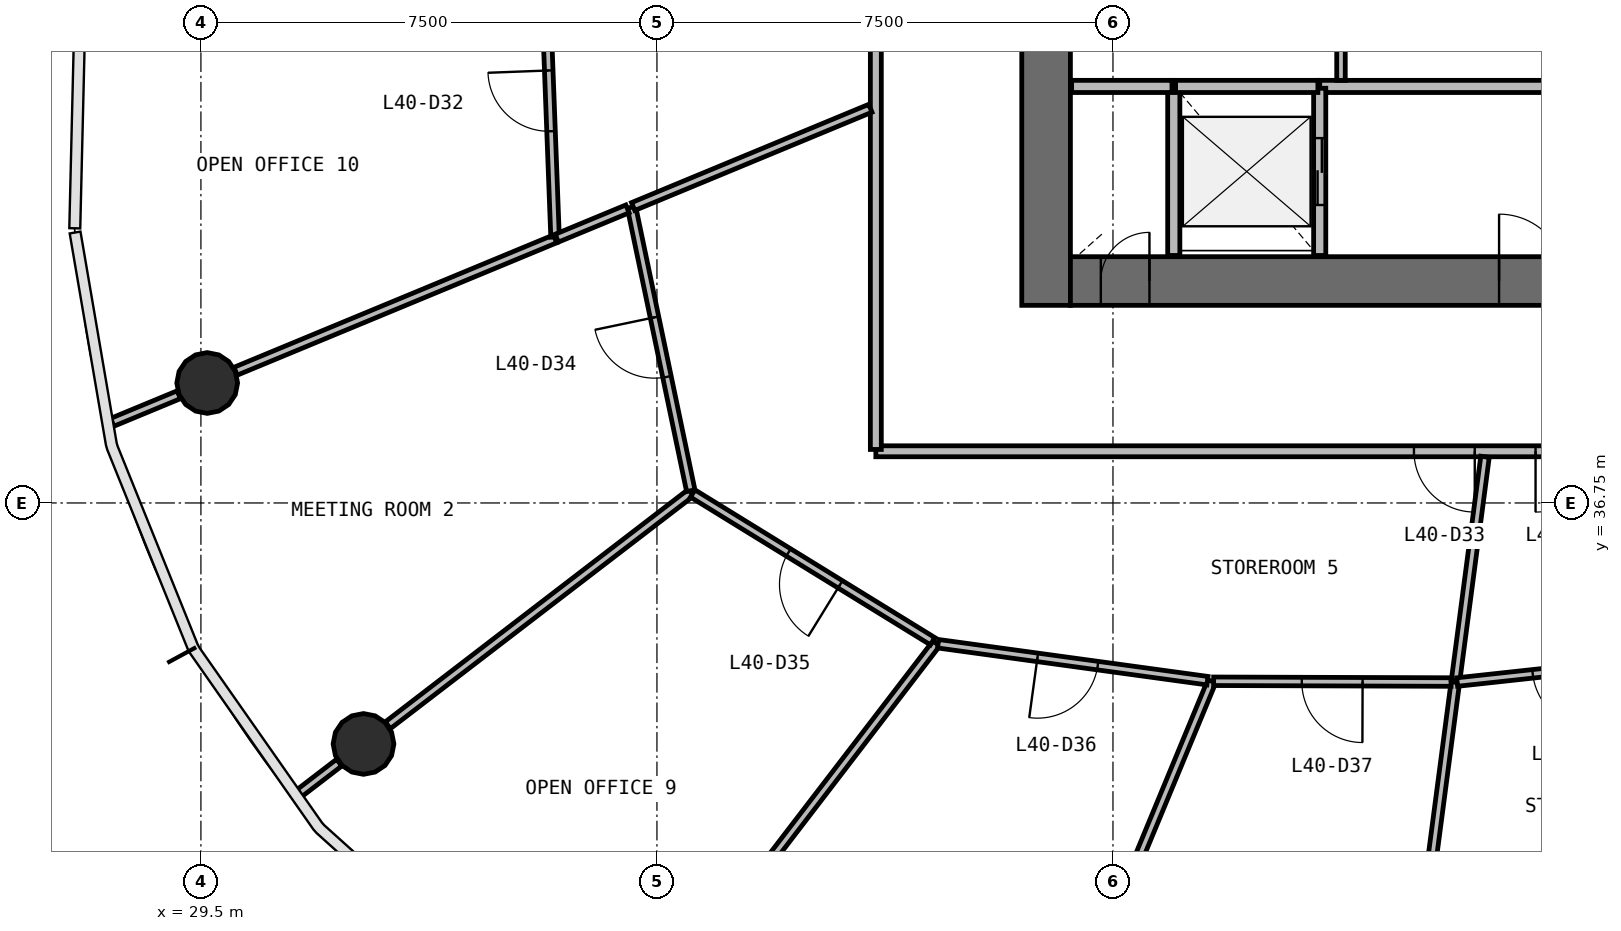
"""IFC4 building model, lengths in metres.
Left out: names, types, materials, properties, quantities, classifications, styles, units other than length and angle.
Written with IfcOpenShell. Run it as: python <this file> out.ifc"""

import sys

from ifc_helpers import new_model, si_unit, direction, frame, frame_2d, origin, origin_2d, place, context, subcontext, project, spatial, rectangle, circle, extrude, source, transform, mapped, element, fill, save


model = new_model("IFC4")
c1 = context("Model", 3, precision=1e-05, world=origin(), true_north=direction((0.0, 1.0)))
c2 = subcontext(c1, "Body", "Model", "MODEL_VIEW")
j1 = project(units=[si_unit("LENGTHUNIT", "METRE"), si_unit("PLANEANGLEUNIT", "RADIAN")], contexts=[c1])
p1 = place(None, origin())
s1 = spatial("IfcSite", under=j1, at=p1, CompositionType="ELEMENT")
p2 = place(p1, origin())
s2 = spatial("IfcBuilding", under=s1, at=p2, CompositionType="ELEMENT")
p3 = place(p2, frame((0.0, 0.0, 168.2)))
s3 = spatial("IfcBuildingStorey", under=s2, at=p3, CompositionType="ELEMENT", Elevation=168.2)
p4 = place(p3, frame((43.4, 56.0, 0.0), z_axis=(0.0, 0.0, 1.0), x_axis=(0.0, -1.0, 0.0)))
e1 = element("IfcWall", 1, at=p4, inside=s3, PredefinedType="SHEAR", context=c2, shape_type="SweptSolid", body=[
    extrude(rectangle(XDim=16.0, YDim=0.8, at=frame_2d((8.0, 0.0))), origin(), (0.0, 0.0, 1.0), 3.9),
])
p5 = place(p4, frame((7.1, 0.0, 0.0)))
e2 = element("IfcOpeningElement", 2, at=p5, cuts=e1, PredefinedType="OPENING", context=c2, shape_type="SweptSolid", body=[
    extrude(rectangle(XDim=1.8, YDim=2.1, at=frame_2d((0.9, 1.05))), frame((0.0, 0.41, 0.0), z_axis=(0.0, -1.0, 0.0), x_axis=(1.0, 0.0, 0.0)), (0.0, 0.0, 1.0), 0.82),
])
p6 = place(p3, frame((43.8, 40.4, 0.0), z_axis=(0.0, 0.0, 1.0), x_axis=(1.0, 0.0, 0.0)))
e3 = element("IfcWall", 3, at=p6, inside=s3, PredefinedType="SHEAR", context=c2, shape_type="SweptSolid", body=[
    extrude(rectangle(XDim=16.4, YDim=0.8, at=frame_2d((8.2, 0.0))), origin(), (0.0, 0.0, 1.0), 3.9),
])
p7 = place(p6, frame((10.1, 0.0, 0.0)))
e4 = element("IfcOpeningElement", 4, at=p7, cuts=e3, PredefinedType="OPENING", context=c2, shape_type="SweptSolid", body=[
    extrude(rectangle(XDim=1.2, YDim=2.1, at=frame_2d((0.6, 1.05))), frame((0.0, 0.41, 0.0), z_axis=(0.0, -1.0, 0.0), x_axis=(1.0, 0.0, 0.0)), (0.0, 0.0, 1.0), 0.82),
])
p8 = place(p6, frame((7.05, 0.0, 0.0)))
e5 = element("IfcOpeningElement", 5, at=p8, cuts=e3, PredefinedType="OPENING", context=c2, shape_type="SweptSolid", body=[
    extrude(rectangle(XDim=1.1, YDim=2.1, at=frame_2d((0.55, 1.05))), frame((0.0, 0.41, 0.0), z_axis=(0.0, -1.0, 0.0), x_axis=(1.0, 0.0, 0.0)), (0.0, 0.0, 1.0), 0.82),
])
p9 = place(p6, frame((0.5, 0.0, 0.0)))
e6 = element("IfcOpeningElement", 6, at=p9, cuts=e3, PredefinedType="OPENING", context=c2, shape_type="SweptSolid", body=[
    extrude(rectangle(XDim=0.8, YDim=2.1, at=frame_2d((0.4, 1.05))), frame((0.0, 0.41, 0.0), z_axis=(0.0, -1.0, 0.0), x_axis=(1.0, 0.0, 0.0)), (0.0, 0.0, 1.0), 0.82),
])
m1 = source(origin(), c2, "Body", "SweptSolid", [
    extrude(circle(Radius=0.5, at=origin_2d()), origin(), (0.0, 0.0, 1.0), 3.9),
])
for number, where, z_axis, x_axis in (
    (7, (29.603, 38.723, 0.0), (0.0, 0.0, 1.0), (1.0, 0.0, 0.0)),
    (8, (32.174, 32.787, 0.0), (0.0, 0.0, 1.0), (1.0, 0.0, 0.0)),
):
    element("IfcColumn", number, at=place(p3, frame(where, z_axis=z_axis, x_axis=x_axis)), inside=s3, PredefinedType="COLUMN", context=c2, shape_type="MappedRepresentation", body=[
        mapped(m1, transform((0.0, 0.0, 0.0), scale=1.0)),
    ])
p10 = place(p3, frame((52.7, 43.6, 0.0), z_axis=(0.0, 0.0, 1.0), x_axis=(-1.0, 0.0, 0.0)))
e9 = element("IfcWall", 9, at=p10, inside=s3, PredefinedType="SOLIDWALL", context=c2, shape_type="SweptSolid", body=[
    extrude(rectangle(XDim=4.8, YDim=0.2, at=frame_2d((2.4, 0.0))), origin(), (0.0, 0.0, 1.0), 3.58),
])
p11 = place(p3, frame((45.5, 43.6, 0.0), z_axis=(0.0, 0.0, 1.0), x_axis=(0.0, -1.0, 0.0)))
e10 = element("IfcWall", 10, at=p11, inside=s3, PredefinedType="SOLIDWALL", context=c2, shape_type="SweptSolid", body=[
    extrude(rectangle(XDim=2.78, YDim=0.2, at=frame_2d((1.39, 0.0))), origin(), (0.0, 0.0, 1.0), 3.58),
])
p12 = place(p3, frame((47.9, 40.82, 0.0), z_axis=(0.0, 0.0, 1.0), x_axis=(0.0, 1.0, 0.0)))
e11 = element("IfcWall", 11, at=p12, inside=s3, PredefinedType="SOLIDWALL", context=c2, shape_type="SweptSolid", body=[
    extrude(rectangle(XDim=2.75, YDim=0.2, at=frame_2d((1.375, 0.0))), origin(), (0.0, 0.0, 1.0), 3.58),
])
p13 = place(p12, frame((0.83, 0.0, 0.0)))
e12 = element("IfcOpeningElement", 12, at=p13, cuts=e11, PredefinedType="OPENING", context=c2, shape_type="SweptSolid", body=[
    extrude(rectangle(XDim=1.1, YDim=2.1, at=frame_2d((0.55, 1.05))), frame((0.0, 0.11, 0.0), z_axis=(0.0, -1.0, 0.0), x_axis=(1.0, 0.0, 0.0)), (0.0, 0.0, 1.0), 0.22),
])
p14 = place(p3, frame((47.87, 43.6, 0.0), z_axis=(0.0, 0.0, 1.0), x_axis=(-1.0, 0.0, 0.0)))
e13 = element("IfcWall", 13, at=p14, inside=s3, PredefinedType="SOLIDWALL", context=c2, shape_type="SweptSolid", body=[
    extrude(rectangle(XDim=2.34, YDim=0.2, at=frame_2d((1.17, 0.0))), origin(), (0.0, 0.0, 1.0), 3.58),
])
p15 = place(p3, frame((45.47, 43.6, 0.0), z_axis=(0.0, 0.0, 1.0), x_axis=(-1.0, 0.0, 0.0)))
e14 = element("IfcWall", 14, at=p15, inside=s3, PredefinedType="SOLIDWALL", context=c2, shape_type="SweptSolid", body=[
    extrude(rectangle(XDim=1.65, YDim=0.2, at=frame_2d((0.825, 0.0))), origin(), (0.0, 0.0, 1.0), 3.58),
])
p16 = place(p3, frame((63.4, 37.6, 0.0), z_axis=(0.0, 0.0, 1.0), x_axis=(-1.0, 0.0, 0.0)))
e15 = element("IfcWall", 15, at=p16, inside=s3, PredefinedType="PARTITIONING", context=c2, shape_type="SweptSolid", body=[
    extrude(rectangle(XDim=22.8, YDim=0.18, at=frame_2d((11.4, 0.0))), origin(), (0.0, 0.0, 1.0), 2.88),
])
p17 = place(p16, frame((12.95, 0.0, 0.0)))
e16 = element("IfcOpeningElement", 16, at=p17, cuts=e15, PredefinedType="OPENING", context=c2, shape_type="SweptSolid", body=[
    extrude(rectangle(XDim=1.0, YDim=2.1, at=frame_2d((0.5, 1.05))), frame((0.0, 0.1, 0.0), z_axis=(0.0, -1.0, 0.0), x_axis=(1.0, 0.0, 0.0)), (0.0, 0.0, 1.0), 0.2),
])
p18 = place(p16, frame((10.95, 0.0, 0.0)))
e17 = element("IfcOpeningElement", 17, at=p18, cuts=e15, PredefinedType="OPENING", context=c2, shape_type="SweptSolid", body=[
    extrude(rectangle(XDim=1.0, YDim=2.1, at=frame_2d((0.5, 1.05))), frame((0.0, 0.1, 0.0), z_axis=(0.0, -1.0, 0.0), x_axis=(1.0, 0.0, 0.0)), (0.0, 0.0, 1.0), 0.2),
])
p19 = place(p16, frame((5.75, 0.0, 0.0)))
e18 = element("IfcOpeningElement", 18, at=p19, cuts=e15, PredefinedType="OPENING", context=c2, shape_type="SweptSolid", body=[
    extrude(rectangle(XDim=1.0, YDim=2.1, at=frame_2d((0.5, 1.05))), frame((0.0, 0.1, 0.0), z_axis=(0.0, -1.0, 0.0), x_axis=(1.0, 0.0, 0.0)), (0.0, 0.0, 1.0), 0.2),
])
p20 = place(p3, frame((40.6, 37.63, 0.0), z_axis=(0.0, 0.0, 1.0), x_axis=(0.0, 1.0, 0.0)))
e19 = element("IfcWall", 19, at=p20, inside=s3, PredefinedType="PARTITIONING", context=c2, shape_type="SweptSolid", body=[
    extrude(rectangle(XDim=20.74, YDim=0.18, at=frame_2d((10.37, 0.0))), origin(), (0.0, 0.0, 1.0), 2.88),
])
p21 = place(p20, frame((12.09, 0.0, 0.0)))
e20 = element("IfcOpeningElement", 20, at=p21, cuts=e19, PredefinedType="OPENING", context=c2, shape_type="SweptSolid", body=[
    extrude(rectangle(XDim=1.0, YDim=2.1, at=frame_2d((0.5, 1.05))), frame((0.0, 0.1, 0.0), z_axis=(0.0, -1.0, 0.0), x_axis=(1.0, 0.0, 0.0)), (0.0, 0.0, 1.0), 0.2),
])
p22 = place(p20, frame((9.89, 0.0, 0.0)))
e21 = element("IfcOpeningElement", 21, at=p22, cuts=e19, PredefinedType="OPENING", context=c2, shape_type="SweptSolid", body=[
    extrude(rectangle(XDim=1.0, YDim=2.1, at=frame_2d((0.5, 1.05))), frame((0.0, 0.1, 0.0), z_axis=(0.0, -1.0, 0.0), x_axis=(1.0, 0.0, 0.0)), (0.0, 0.0, 1.0), 0.2),
])
p23 = place(p3, frame((46.125, 33.818, 0.0), z_axis=(0.0, 0.0, 1.0), x_axis=(-0.38267385781, -0.923883498364, 0.0)))
e22 = element("IfcWall", 22, at=p23, inside=s3, PredefinedType="PARTITIONING", context=c2, shape_type="SweptSolid", body=[
    extrude(rectangle(XDim=6.583, YDim=0.14, at=frame_2d((3.292, 0.0))), origin(), (0.0, 0.0, 1.0), 2.88),
])
p24 = place(p3, frame((41.594, 34.439, 0.0), z_axis=(0.0, 0.0, 1.0), x_axis=(-0.608759289162, -0.793354982249, 0.0)))
e23 = element("IfcWall", 23, at=p24, inside=s3, PredefinedType="PARTITIONING", context=c2, shape_type="SweptSolid", body=[
    extrude(rectangle(XDim=6.426, YDim=0.14, at=frame_2d((3.213, 0.0))), origin(), (0.0, 0.0, 1.0), 2.88),
])
p25 = place(p3, frame((37.563, 36.922, 0.0), z_axis=(0.0, 0.0, 1.0), x_axis=(-0.793368198418, -0.608742065032, 0.0)))
e24 = element("IfcWall", 24, at=p25, inside=s3, PredefinedType="PARTITIONING", context=c2, shape_type="SweptSolid", body=[
    extrude(rectangle(XDim=6.288, YDim=0.14, at=frame_2d((3.144, 0.0))), origin(), (0.0, 0.0, 1.0), 2.88),
])
p26 = place(p3, frame((50.131, 33.802, 0.0), z_axis=(0.0, 0.0, 1.0), x_axis=(-0.130558749059, -0.991440574641, 0.0)))
e25 = element("IfcWall", 25, at=p26, inside=s3, PredefinedType="PARTITIONING", context=c2, shape_type="SweptSolid", body=[
    extrude(rectangle(XDim=6.059, YDim=0.14, at=frame_2d((3.029, 0.0))), origin(), (0.0, 0.0, 1.0), 2.88),
])
p27 = place(p3, frame((35.325, 41.093, 0.0), z_axis=(0.0, 0.0, 1.0), x_axis=(-0.923876123861, -0.38269166147, 0.0)))
e26 = element("IfcWall", 26, at=p27, inside=s3, PredefinedType="PARTITIONING", context=c2, shape_type="SweptSolid", body=[
    extrude(rectangle(XDim=5.689, YDim=0.14, at=frame_2d((2.844, 0.0))), origin(), (0.0, 0.0, 1.0), 2.88),
])
p28 = place(p3, frame((37.557, 36.951, 0.0), z_axis=(0.0, 0.0, 1.0), x_axis=(-0.204772935083, 0.978809503968, 0.0)))
e27 = element("IfcWall", 27, at=p28, inside=s3, PredefinedType="PARTITIONING", context=c2, shape_type="SweptSolid", body=[
    extrude(rectangle(XDim=4.763, YDim=0.14, at=frame_2d((2.381, 0.0))), origin(), (0.0, 0.0, 1.0), 2.88),
])
p29 = place(p28, frame((1.913, 0.0, 0.0)))
e28 = element("IfcOpeningElement", 28, at=p29, cuts=e27, PredefinedType="OPENING", context=c2, shape_type="SweptSolid", body=[
    extrude(rectangle(XDim=1.0, YDim=2.1, at=frame_2d((0.5, 1.05))), frame((0.0, 0.08, 0.0), z_axis=(0.0, -1.0, 0.0), x_axis=(1.0, 0.0, 0.0)), (0.0, 0.0, 1.0), 0.16),
])
p30 = place(p3, frame((41.534, 34.476, 0.0), z_axis=(0.0, 0.0, 1.0), x_axis=(-0.851519012553, 0.524323727539, 0.0)))
e29 = element("IfcWall", 29, at=p30, inside=s3, PredefinedType="PARTITIONING", context=c2, shape_type="SweptSolid", body=[
    extrude(rectangle(XDim=4.635, YDim=0.14, at=frame_2d((2.317, 0.0))), origin(), (0.0, 0.0, 1.0), 2.88),
])
p31 = place(p30, frame((1.784, 0.0, 0.0)))
e30 = element("IfcOpeningElement", 30, at=p31, cuts=e29, PredefinedType="OPENING", context=c2, shape_type="SweptSolid", body=[
    extrude(rectangle(XDim=1.0, YDim=2.1, at=frame_2d((0.5, 1.05))), frame((0.0, 0.08, 0.0), z_axis=(0.0, -1.0, 0.0), x_axis=(1.0, 0.0, 0.0)), (0.0, 0.0, 1.0), 0.16),
])
p32 = place(p3, frame((35.324, 41.123, 0.0), z_axis=(0.0, 0.0, 1.0), x_axis=(-0.03785928554, 0.999283080262, 0.0)))
e31 = element("IfcWall", 31, at=p32, inside=s3, PredefinedType="PARTITIONING", context=c2, shape_type="SweptSolid", body=[
    extrude(rectangle(XDim=4.591, YDim=0.14, at=frame_2d((2.296, 0.0))), origin(), (0.0, 0.0, 1.0), 2.88),
])
p33 = place(p32, frame((1.741, 0.0, 0.0)))
e32 = element("IfcOpeningElement", 32, at=p33, cuts=e31, PredefinedType="OPENING", context=c2, shape_type="SweptSolid", body=[
    extrude(rectangle(XDim=1.0, YDim=2.1, at=frame_2d((0.5, 1.05))), frame((0.0, 0.08, 0.0), z_axis=(0.0, -1.0, 0.0), x_axis=(1.0, 0.0, 0.0)), (0.0, 0.0, 1.0), 0.16),
])
p34 = place(p3, frame((46.054, 33.828, 0.0), z_axis=(0.0, 0.0, 1.0), x_axis=(-0.99072887991, 0.135853916072, 0.0)))
e33 = element("IfcWall", 33, at=p34, inside=s3, PredefinedType="PARTITIONING", context=c2, shape_type="SweptSolid", body=[
    extrude(rectangle(XDim=4.471, YDim=0.14, at=frame_2d((2.236, 0.0))), origin(), (0.0, 0.0, 1.0), 2.88),
])
p35 = place(p34, frame((1.821, 0.0, 0.0)))
e34 = element("IfcOpeningElement", 34, at=p35, cuts=e33, PredefinedType="OPENING", context=c2, shape_type="SweptSolid", body=[
    extrude(rectangle(XDim=1.0, YDim=2.1, at=frame_2d((0.5, 1.05))), frame((0.0, 0.08, 0.0), z_axis=(0.0, -1.0, 0.0), x_axis=(1.0, 0.0, 0.0)), (0.0, 0.0, 1.0), 0.16),
])
p36 = place(p3, frame((40.51, 43.241, 0.0), z_axis=(0.0, 0.0, 1.0), x_axis=(-0.923873778324, -0.382697323908, 0.0)))
e35 = element("IfcWall", 35, at=p36, inside=s3, PredefinedType="PARTITIONING", context=c2, shape_type="SweptSolid", body=[
    extrude(rectangle(XDim=4.223, YDim=0.14, at=frame_2d((2.111, 0.0))), origin(), (0.0, 0.0, 1.0), 2.88),
])
p37 = place(p3, frame((50.061, 33.805, 0.0), z_axis=(0.0, 0.0, 1.0), x_axis=(-0.999994916784, 0.003188480197, 0.0)))
e36 = element("IfcWall", 36, at=p37, inside=s3, PredefinedType="PARTITIONING", context=c2, shape_type="SweptSolid", body=[
    extrude(rectangle(XDim=3.905, YDim=0.14, at=frame_2d((1.953, 0.0))), origin(), (0.0, 0.0, 1.0), 2.88),
])
p38 = place(p37, frame((1.455, 0.0, 0.0)))
e37 = element("IfcOpeningElement", 37, at=p38, cuts=e36, PredefinedType="OPENING", context=c2, shape_type="SweptSolid", body=[
    extrude(rectangle(XDim=1.0, YDim=2.1, at=frame_2d((0.5, 1.05))), frame((0.0, 0.08, 0.0), z_axis=(0.0, -1.0, 0.0), x_axis=(1.0, 0.0, 0.0)), (0.0, 0.0, 1.0), 0.16),
])
p39 = place(p3, frame((50.619, 37.51, 0.0), z_axis=(0.0, 0.0, 1.0), x_axis=(-0.130478341519, -0.991451159863, 0.0)))
e38 = element("IfcWall", 38, at=p39, inside=s3, PredefinedType="PARTITIONING", context=c2, shape_type="SweptSolid", body=[
    extrude(rectangle(XDim=3.71, YDim=0.14, at=frame_2d((1.855, 0.0))), origin(), (0.0, 0.0, 1.0), 2.88),
])
p40 = place(p3, frame((53.787, 34.199, 0.0), z_axis=(0.0, 0.0, 1.0), x_axis=(-0.994154931326, -0.107962829343, 0.0)))
e39 = element("IfcWall", 39, at=p40, inside=s3, PredefinedType="PARTITIONING", context=c2, shape_type="SweptSolid", body=[
    extrude(rectangle(XDim=3.647, YDim=0.14, at=frame_2d((1.824, 0.0))), origin(), (0.0, 0.0, 1.0), 2.88),
])
p41 = place(p40, frame((1.397, 0.0, 0.0)))
e40 = element("IfcOpeningElement", 40, at=p41, cuts=e39, PredefinedType="OPENING", context=c2, shape_type="SweptSolid", body=[
    extrude(rectangle(XDim=1.0, YDim=2.1, at=frame_2d((0.5, 1.05))), frame((0.0, 0.08, 0.0), z_axis=(0.0, -1.0, 0.0), x_axis=(1.0, 0.0, 0.0)), (0.0, 0.0, 1.0), 0.16),
])
p42 = place(p3, frame((48.25, 43.7, 0.0), z_axis=(0.0, 0.0, 1.0), x_axis=(0.0, 1.0, 0.0)))
e41 = element("IfcWall", 41, at=p42, inside=s3, PredefinedType="PARTITIONING", context=c2, shape_type="SweptSolid", body=[
    extrude(rectangle(XDim=2.29, YDim=0.14, at=frame_2d((1.145, 0.0))), origin(), (0.0, 0.0, 1.0), 2.88),
])
p43 = place(p3, frame((36.515, 41.586, 0.0), z_axis=(0.0, 0.0, 1.0), x_axis=(-0.923855963606, -0.38274032778, 0.0)))
e42 = element("IfcWall", 42, at=p43, inside=s3, PredefinedType="PARTITIONING", context=c2, shape_type="SweptSolid", body=[
    extrude(rectangle(XDim=1.258, YDim=0.14, at=frame_2d((0.629, 0.0))), origin(), (0.0, 0.0, 1.0), 2.88),
])
p44 = place(p3, frame((29.137, 38.53, 0.0), z_axis=(0.0, 0.0, 1.0), x_axis=(-0.923891330959, -0.382654947151, 0.0)))
e43 = element("IfcWall", 43, at=p44, inside=s3, PredefinedType="PARTITIONING", context=c2, shape_type="SweptSolid", body=[
    extrude(rectangle(XDim=1.186, YDim=0.14, at=frame_2d((0.593, 0.0))), origin(), (0.0, 0.0, 1.0), 2.88),
])
p45 = place(p3, frame((31.774, 32.48, 0.0), z_axis=(0.0, 0.0, 1.0), x_axis=(-0.793315863556, -0.608810266529, 0.0)))
e44 = element("IfcWall", 44, at=p45, inside=s3, PredefinedType="PARTITIONING", context=c2, shape_type="SweptSolid", body=[
    extrude(rectangle(XDim=0.839, YDim=0.14, at=frame_2d((0.419, 0.0))), origin(), (0.0, 0.0, 1.0), 2.88),
])
m2 = source(origin(), c2, "Body", "SweptSolid", [
    extrude(rectangle(XDim=1.1, YDim=2.1, at=frame_2d((0.55, 1.05))), frame((0.0, 0.025, 0.0), z_axis=(0.0, -1.0, 0.0), x_axis=(1.0, 0.0, 0.0)), (0.0, 0.0, 1.0), 0.05),
])
p46 = place(p13, origin())
e45 = element("IfcDoor", 45, at=p46, inside=s3, OperationType="DOUBLE_DOOR_SLIDING", PredefinedType="USERDEFINED", context=c2, shape_type="MappedRepresentation", body=[
    mapped(m2, transform((0.0, 0.0, 0.0), scale=1.0)),
])
fill(e12, e45)
m3 = source(origin(), c2, "Body", "SweptSolid", [
    extrude(rectangle(XDim=1.1, YDim=2.1, at=frame_2d((0.55, 1.05))), frame((0.0, 0.025, 0.0), z_axis=(0.0, -1.0, 0.0), x_axis=(1.0, 0.0, 0.0)), (0.0, 0.0, 1.0), 0.05),
])
p47 = place(p8, origin())
e46 = element("IfcDoor", 46, at=p47, inside=s3, OperationType="SINGLE_SWING_LEFT", PredefinedType="DOOR", context=c2, shape_type="MappedRepresentation", body=[
    mapped(m3, transform((0.0, 0.0, 0.0), scale=1.0)),
])
fill(e5, e46)
m4 = source(origin(), c2, "Body", "SweptSolid", [
    extrude(rectangle(XDim=0.8, YDim=2.1, at=frame_2d((0.4, 1.05))), frame((0.0, 0.025, 0.0), z_axis=(0.0, -1.0, 0.0), x_axis=(1.0, 0.0, 0.0)), (0.0, 0.0, 1.0), 0.05),
])
p48 = place(p9, origin())
e47 = element("IfcDoor", 47, at=p48, inside=s3, OperationType="SINGLE_SWING_RIGHT", PredefinedType="DOOR", context=c2, shape_type="MappedRepresentation", body=[
    mapped(m4, transform((0.0, 0.0, 0.0), scale=1.0)),
])
fill(e6, e47)
m5 = source(origin(), c2, "Body", "SweptSolid", [
    extrude(rectangle(XDim=1.0, YDim=2.1, at=frame_2d((0.5, 1.05))), frame((0.0, 0.025, 0.0), z_axis=(0.0, -1.0, 0.0), x_axis=(1.0, 0.0, 0.0)), (0.0, 0.0, 1.0), 0.05),
])
p49 = place(p33, origin())
e48 = element("IfcDoor", 48, at=p49, inside=s3, OperationType="SINGLE_SWING_RIGHT", PredefinedType="DOOR", context=c2, shape_type="MappedRepresentation", body=[
    mapped(m5, transform((0.0, 0.0, 0.0), scale=1.0)),
])
fill(e32, e48)
p50 = place(p17, origin())
e49 = element("IfcDoor", 49, at=p50, inside=s3, OperationType="SINGLE_SWING_LEFT", PredefinedType="DOOR", context=c2, shape_type="MappedRepresentation", body=[
    mapped(m5, transform((0.0, 0.0, 0.0), scale=1.0)),
])
fill(e16, e49)
p51 = place(p29, origin())
e50 = element("IfcDoor", 50, at=p51, inside=s3, OperationType="SINGLE_SWING_RIGHT", PredefinedType="DOOR", context=c2, shape_type="MappedRepresentation", body=[
    mapped(m5, transform((0.0, 0.0, 0.0), scale=1.0)),
])
fill(e28, e50)
p52 = place(p31, origin())
e51 = element("IfcDoor", 51, at=p52, inside=s3, OperationType="SINGLE_SWING_LEFT", PredefinedType="DOOR", context=c2, shape_type="MappedRepresentation", body=[
    mapped(m5, transform((0.0, 0.0, 0.0), scale=1.0)),
])
fill(e30, e51)
p53 = place(p35, origin())
e52 = element("IfcDoor", 52, at=p53, inside=s3, OperationType="SINGLE_SWING_RIGHT", PredefinedType="DOOR", context=c2, shape_type="MappedRepresentation", body=[
    mapped(m5, transform((0.0, 0.0, 0.0), scale=1.0)),
])
fill(e34, e52)
p54 = place(p38, origin())
e53 = element("IfcDoor", 53, at=p54, inside=s3, OperationType="SINGLE_SWING_LEFT", PredefinedType="DOOR", context=c2, shape_type="MappedRepresentation", body=[
    mapped(m5, transform((0.0, 0.0, 0.0), scale=1.0)),
])
fill(e37, e53)
p55 = place(p18, origin())
e54 = element("IfcDoor", 54, at=p55, inside=s3, OperationType="SINGLE_SWING_RIGHT", PredefinedType="DOOR", context=c2, shape_type="MappedRepresentation", body=[
    mapped(m5, transform((0.0, 0.0, 0.0), scale=1.0)),
])
fill(e17, e54)
p56 = place(p41, origin())
e55 = element("IfcDoor", 55, at=p56, inside=s3, OperationType="SINGLE_SWING_LEFT", PredefinedType="DOOR", context=c2, shape_type="MappedRepresentation", body=[
    mapped(m5, transform((0.0, 0.0, 0.0), scale=1.0)),
])
fill(e40, e55)
save(model, sys.argv[1])
